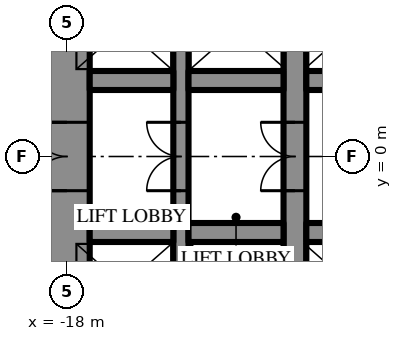
"""IFC4 building model, lengths in metres.
Left out: names, types, materials, properties, quantities, classifications, styles, units other than length and angle.
Written with IfcOpenShell. Run it as: python <this file> out.ifc"""

import sys

from ifc_helpers import new_model, si_unit, direction, frame, frame_2d, origin, place, context, subcontext, project, spatial, rectangle, extrude, element, fill, save


model = new_model("IFC4")
c1 = context("Model", 3, precision=1e-05, world=origin(), true_north=direction((0.0, 1.0)))
c2 = subcontext(c1, "Body", "Model", "MODEL_VIEW")
j1 = project(units=[si_unit("LENGTHUNIT", "METRE"), si_unit("PLANEANGLEUNIT", "RADIAN")], contexts=[c1])
p1 = place(None, origin())
s1 = spatial("IfcSite", under=j1, at=p1, CompositionType="ELEMENT")
p2 = place(p1, origin())
s2 = spatial("IfcBuilding", under=s1, at=p2, CompositionType="ELEMENT")
p3 = place(p2, frame((0.0, 0.0, 86.5)))
s3 = spatial("IfcBuildingStorey", under=s2, at=p3, CompositionType="ELEMENT", Elevation=86.5)
p4 = place(p3, frame((-18.0, 10.7, 0.0), z_axis=(0.0, 0.0, 1.0), x_axis=(0.0, -1.0, 0.0)))
e1 = element("IfcWall", 1, at=p4, inside=s3, PredefinedType="SHEAR", context=c2, shape_type="SweptSolid", body=[
    extrude(rectangle(XDim=21.4, YDim=1.2, at=frame_2d((10.7, 0.0))), origin(), (0.0, 0.0, 1.0), 4.2),
])
p5 = place(p4, frame((9.8, 0.0, 0.0)))
e2 = element("IfcOpeningElement", 2, at=p5, cuts=e1, PredefinedType="OPENING", context=c2, shape_type="SweptSolid", body=[
    extrude(rectangle(XDim=1.8, YDim=2.4, at=frame_2d((0.9, 1.2))), frame((0.0, 0.61, 0.0), z_axis=(0.0, -1.0, 0.0), x_axis=(1.0, 0.0, 0.0)), (0.0, 0.0, 1.0), 1.22),
])
p6 = place(p3, frame((-12.0, -10.7, 0.0), z_axis=(0.0, 0.0, 1.0), x_axis=(0.0, 1.0, 0.0)))
e3 = element("IfcWall", 3, at=p6, inside=s3, PredefinedType="SHEAR", context=c2, shape_type="SweptSolid", body=[
    extrude(rectangle(XDim=21.4, YDim=0.6, at=frame_2d((10.7, 0.0))), origin(), (0.0, 0.0, 1.0), 4.2),
])
p7 = place(p6, frame((9.8, 0.0, 0.0)))
e4 = element("IfcOpeningElement", 4, at=p7, cuts=e3, PredefinedType="OPENING", context=c2, shape_type="SweptSolid", body=[
    extrude(rectangle(XDim=1.8, YDim=2.4, at=frame_2d((0.9, 1.2))), frame((0.0, 0.31, 0.0), z_axis=(0.0, -1.0, 0.0), x_axis=(1.0, 0.0, 0.0)), (0.0, 0.0, 1.0), 0.62),
])
p8 = place(p3, frame((-15.0, -10.7, 0.0), z_axis=(0.0, 0.0, 1.0), x_axis=(0.0, 1.0, 0.0)))
e5 = element("IfcWall", 5, at=p8, inside=s3, PredefinedType="SHEAR", context=c2, shape_type="SweptSolid", body=[
    extrude(rectangle(XDim=21.4, YDim=0.4, at=frame_2d((10.7, 0.0))), origin(), (0.0, 0.0, 1.0), 4.2),
])
p9 = place(p8, frame((9.8, 0.0, 0.0)))
e6 = element("IfcOpeningElement", 6, at=p9, cuts=e5, PredefinedType="OPENING", context=c2, shape_type="SweptSolid", body=[
    extrude(rectangle(XDim=1.8, YDim=2.4, at=frame_2d((0.9, 1.2))), frame((0.0, 0.21, 0.0), z_axis=(0.0, -1.0, 0.0), x_axis=(1.0, 0.0, 0.0)), (0.0, 0.0, 1.0), 0.42),
])
p10 = place(p3, frame((-17.4, 2.0, 0.0), z_axis=(0.0, 0.0, 1.0), x_axis=(1.0, 0.0, 0.0)))
e7 = element("IfcWall", 7, at=p10, inside=s3, PredefinedType="SHEAR", context=c2, shape_type="SweptSolid", body=[
    extrude(rectangle(XDim=2.2, YDim=0.5, at=frame_2d((1.1, 0.0))), origin(), (0.0, 0.0, 1.0), 4.2),
])
p11 = place(p3, frame((-14.8, 2.0, 0.0), z_axis=(0.0, 0.0, 1.0), x_axis=(1.0, 0.0, 0.0)))
e8 = element("IfcWall", 8, at=p11, inside=s3, PredefinedType="SHEAR", context=c2, shape_type="SweptSolid", body=[
    extrude(rectangle(XDim=2.5, YDim=0.5, at=frame_2d((1.25, 0.0))), origin(), (0.0, 0.0, 1.0), 4.2),
])
p12 = place(p3, frame((-11.7, 2.0, 0.0), z_axis=(0.0, 0.0, 1.0), x_axis=(1.0, 0.0, 0.0)))
e9 = element("IfcWall", 9, at=p12, inside=s3, PredefinedType="SHEAR", context=c2, shape_type="SweptSolid", body=[
    extrude(rectangle(XDim=5.9, YDim=0.5, at=frame_2d((2.95, 0.0))), origin(), (0.0, 0.0, 1.0), 4.2),
])
p13 = place(p3, frame((3.2, -2.0, 0.0), z_axis=(0.0, 0.0, 1.0), x_axis=(-1.0, 0.0, 0.0)))
e10 = element("IfcWall", 10, at=p13, inside=s3, PredefinedType="SHEAR", context=c2, shape_type="SweptSolid", body=[
    extrude(rectangle(XDim=14.9, YDim=0.5, at=frame_2d((7.45, 0.0))), origin(), (0.0, 0.0, 1.0), 4.2),
])
p14 = place(p13, frame((1.15, 0.0, 0.0)))
e11 = element("IfcOpeningElement", 11, at=p14, cuts=e10, PredefinedType="OPENING", context=c2, shape_type="SweptSolid", body=[
    extrude(rectangle(XDim=1.1, YDim=2.2, at=frame_2d((0.55, 1.1))), frame((0.0, 0.26, 0.0), z_axis=(0.0, -1.0, 0.0), x_axis=(1.0, 0.0, 0.0)), (0.0, 0.0, 1.0), 0.52),
])
p15 = place(p13, frame((4.15, 0.0, 0.0)))
e12 = element("IfcOpeningElement", 12, at=p15, cuts=e10, PredefinedType="OPENING", context=c2, shape_type="SweptSolid", body=[
    extrude(rectangle(XDim=1.1, YDim=2.2, at=frame_2d((0.55, 1.1))), frame((0.0, 0.26, 0.0), z_axis=(0.0, -1.0, 0.0), x_axis=(1.0, 0.0, 0.0)), (0.0, 0.0, 1.0), 0.52),
])
p16 = place(p13, frame((7.15, 0.0, 0.0)))
e13 = element("IfcOpeningElement", 13, at=p16, cuts=e10, PredefinedType="OPENING", context=c2, shape_type="SweptSolid", body=[
    extrude(rectangle(XDim=1.1, YDim=2.2, at=frame_2d((0.55, 1.1))), frame((0.0, 0.26, 0.0), z_axis=(0.0, -1.0, 0.0), x_axis=(1.0, 0.0, 0.0)), (0.0, 0.0, 1.0), 0.52),
])
p17 = place(p13, frame((10.15, 0.0, 0.0)))
e14 = element("IfcOpeningElement", 14, at=p17, cuts=e10, PredefinedType="OPENING", context=c2, shape_type="SweptSolid", body=[
    extrude(rectangle(XDim=1.1, YDim=2.2, at=frame_2d((0.55, 1.1))), frame((0.0, 0.26, 0.0), z_axis=(0.0, -1.0, 0.0), x_axis=(1.0, 0.0, 0.0)), (0.0, 0.0, 1.0), 0.52),
])
p18 = place(p3, frame((-12.3, -2.0, 0.0), z_axis=(0.0, 0.0, 1.0), x_axis=(-1.0, 0.0, 0.0)))
e15 = element("IfcWall", 15, at=p18, inside=s3, PredefinedType="SHEAR", context=c2, shape_type="SweptSolid", body=[
    extrude(rectangle(XDim=2.5, YDim=0.5, at=frame_2d((1.25, 0.0))), origin(), (0.0, 0.0, 1.0), 4.2),
])
p19 = place(p3, frame((-15.2, -2.0, 0.0), z_axis=(0.0, 0.0, 1.0), x_axis=(-1.0, 0.0, 0.0)))
e16 = element("IfcWall", 16, at=p19, inside=s3, PredefinedType="SHEAR", context=c2, shape_type="SweptSolid", body=[
    extrude(rectangle(XDim=2.2, YDim=0.5, at=frame_2d((1.1, 0.0))), origin(), (0.0, 0.0, 1.0), 4.2),
])
p20 = place(p5, frame((1.8, 0.0, 0.0), z_axis=(0.0, 0.0, 1.0), x_axis=(-1.0, 0.0, 0.0)))
e17 = element("IfcDoor", 17, at=p20, inside=s3, OperationType="DOUBLE_DOOR_SINGLE_SWING", PredefinedType="DOOR", context=c2, shape_type="SweptSolid", body=[
    extrude(rectangle(XDim=1.8, YDim=2.4, at=frame_2d((0.9, 1.2))), frame((0.0, 0.025, 0.0), z_axis=(0.0, -1.0, 0.0), x_axis=(1.0, 0.0, 0.0)), (0.0, 0.0, 1.0), 0.05),
])
fill(e2, e17)
p21 = place(p7, origin())
e18 = element("IfcDoor", 18, at=p21, inside=s3, OperationType="DOUBLE_DOOR_SINGLE_SWING", PredefinedType="DOOR", context=c2, shape_type="SweptSolid", body=[
    extrude(rectangle(XDim=1.8, YDim=2.4, at=frame_2d((0.9, 1.2))), frame((0.0, 0.025, 0.0), z_axis=(0.0, -1.0, 0.0), x_axis=(1.0, 0.0, 0.0)), (0.0, 0.0, 1.0), 0.05),
])
fill(e4, e18)
p22 = place(p9, origin())
e19 = element("IfcDoor", 19, at=p22, inside=s3, OperationType="DOUBLE_DOOR_SINGLE_SWING", PredefinedType="DOOR", context=c2, shape_type="SweptSolid", body=[
    extrude(rectangle(XDim=1.8, YDim=2.4, at=frame_2d((0.9, 1.2))), frame((0.0, 0.025, 0.0), z_axis=(0.0, -1.0, 0.0), x_axis=(1.0, 0.0, 0.0)), (0.0, 0.0, 1.0), 0.05),
])
fill(e6, e19)
save(model, sys.argv[1])
